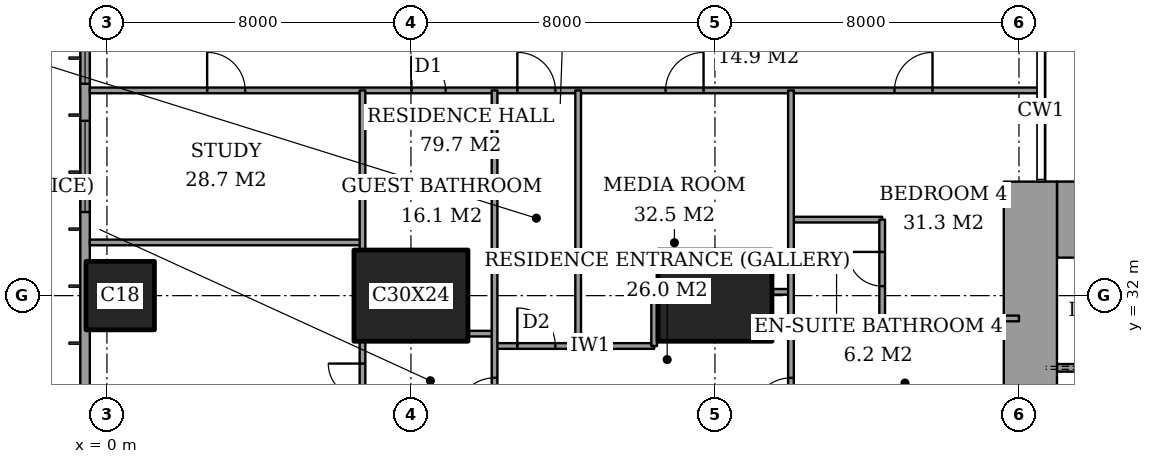
"""IFC4 building model, lengths in metres.
Left out: names, types, materials, properties, quantities, classifications, styles, units other than length and angle.
Written with IfcOpenShell. Run it as: python <this file> out.ifc"""

import sys

from ifc_helpers import new_model, si_unit, direction, frame, frame_2d, origin, origin_2d, place, context, subcontext, project, spatial, rectangle, extrude, element, fill, save


model = new_model("IFC4")
c1 = context("Model", 3, precision=1e-05, world=origin(), true_north=direction((0.0, 1.0)))
c2 = subcontext(c1, "Body", "Model", "MODEL_VIEW")
j1 = project(units=[si_unit("LENGTHUNIT", "METRE"), si_unit("PLANEANGLEUNIT", "RADIAN")], contexts=[c1])
p1 = place(None, origin())
s1 = spatial("IfcSite", under=j1, at=p1, CompositionType="ELEMENT")
p2 = place(p1, origin())
s2 = spatial("IfcBuilding", under=s1, at=p2, CompositionType="ELEMENT")
p3 = place(p2, frame((0.0, 0.0, 211.0)))
s3 = spatial("IfcBuildingStorey", under=s2, at=p3, CompositionType="ELEMENT", Elevation=211.0)
p4 = place(p3, frame((0.35, 32.0, 0.0), z_axis=(0.0, 0.0, 1.0), x_axis=(1.0, 0.0, 0.0)))
e1 = element("IfcColumn", 1, at=p4, inside=s3, PredefinedType="COLUMN", context=c2, shape_type="SweptSolid", body=[
    extrude(rectangle(XDim=1.8, YDim=1.8, at=origin_2d()), origin(), (0.0, 0.0, 1.0), 3.6),
])
for number, where, z_axis, x_axis in (
    (2, (8.0, 32.0, 0.0), (0.0, 0.0, 1.0), (1.0, 0.0, 0.0)),
    (3, (16.0, 32.0, 0.0), (0.0, 0.0, 1.0), (1.0, 0.0, 0.0)),
):
    element("IfcColumn", number, at=place(p3, frame(where, z_axis=z_axis, x_axis=x_axis)), inside=s3, PredefinedType="COLUMN", context=c2, shape_type="SweptSolid", body=[
        extrude(rectangle(XDim=3.0, YDim=2.4, at=origin_2d()), origin(), (0.0, 0.0, 1.0), 3.6),
    ])
p5 = place(p3, frame((25.0, 34.0, 0.0), z_axis=(0.0, 0.0, 1.0), x_axis=(1.0, 0.0, 0.0)))
e4 = element("IfcWall", 4, at=p5, inside=s3, PredefinedType="SHEAR", context=c2, shape_type="SweptSolid", body=[
    extrude(rectangle(XDim=3.15, YDim=2.0, at=frame_2d((1.575, 0.0))), origin(), (0.0, 0.0, 1.0), 3.6),
])
p6 = place(p3, frame((24.3, 23.15, 0.0), z_axis=(0.0, 0.0, 1.0), x_axis=(0.0, 1.0, 0.0)))
e5 = element("IfcWall", 5, at=p6, inside=s3, PredefinedType="SHEAR", context=c2, shape_type="SweptSolid", body=[
    extrude(rectangle(XDim=11.85, YDim=1.4, at=frame_2d((5.925, 0.0))), origin(), (0.0, 0.0, 1.0), 3.6),
])
p7 = place(p6, frame((0.75, 0.0, 0.0)))
e6 = element("IfcOpeningElement", 6, at=p7, cuts=e5, PredefinedType="OPENING", context=c2, shape_type="SweptSolid", body=[
    extrude(rectangle(XDim=1.8, YDim=2.4, at=frame_2d((0.9, 1.2))), frame((0.0, 0.71, 0.0), z_axis=(0.0, -1.0, 0.0), x_axis=(1.0, 0.0, 0.0)), (0.0, 0.0, 1.0), 1.42),
])
p8 = place(p3, frame((-0.575, 44.825, 0.0), z_axis=(0.0, 0.0, 1.0), x_axis=(0.0, -1.0, 0.0)))
e7 = element("IfcWall", 7, at=p8, inside=s3, PredefinedType="SOLIDWALL", context=c2, shape_type="SweptSolid", body=[
    extrude(rectangle(XDim=41.65, YDim=0.25, at=frame_2d((20.825, 0.0))), origin(), (0.0, 0.0, 1.0), 3.6),
])
p9 = place(p8, frame((0.825, 0.0, 0.2)))
e8 = element("IfcOpeningElement", 8, at=p9, cuts=e7, PredefinedType="OPENING", context=c2, shape_type="SweptSolid", body=[
    extrude(rectangle(XDim=2.4, YDim=2.4, at=frame_2d((1.2, 1.2))), frame((0.0, 0.135, 0.0), z_axis=(0.0, -1.0, 0.0), x_axis=(1.0, 0.0, 0.0)), (0.0, 0.0, 1.0), 0.27),
])
p10 = place(p8, frame((6.05, 0.0, 0.2)))
e9 = element("IfcOpeningElement", 9, at=p10, cuts=e7, PredefinedType="OPENING", context=c2, shape_type="SweptSolid", body=[
    extrude(rectangle(XDim=1.2, YDim=2.4, at=frame_2d((0.6, 1.2))), frame((0.0, 0.135, 0.0), z_axis=(0.0, -1.0, 0.0), x_axis=(1.0, 0.0, 0.0)), (0.0, 0.0, 1.0), 0.27),
])
p11 = place(p8, frame((8.225, 0.0, 0.2)))
e10 = element("IfcOpeningElement", 10, at=p11, cuts=e7, PredefinedType="OPENING", context=c2, shape_type="SweptSolid", body=[
    extrude(rectangle(XDim=2.4, YDim=2.4, at=frame_2d((1.2, 1.2))), frame((0.0, 0.135, 0.0), z_axis=(0.0, -1.0, 0.0), x_axis=(1.0, 0.0, 0.0)), (0.0, 0.0, 1.0), 0.27),
])
p12 = place(p8, frame((15.625, 0.0, 0.2)))
e11 = element("IfcOpeningElement", 11, at=p12, cuts=e7, PredefinedType="OPENING", context=c2, shape_type="SweptSolid", body=[
    extrude(rectangle(XDim=2.4, YDim=2.4, at=frame_2d((1.2, 1.2))), frame((0.0, 0.135, 0.0), z_axis=(0.0, -1.0, 0.0), x_axis=(1.0, 0.0, 0.0)), (0.0, 0.0, 1.0), 0.27),
])
p13 = place(p8, frame((23.625, 0.0, 0.2)))
e12 = element("IfcOpeningElement", 12, at=p13, cuts=e7, PredefinedType="OPENING", context=c2, shape_type="SweptSolid", body=[
    extrude(rectangle(XDim=2.4, YDim=2.4, at=frame_2d((1.2, 1.2))), frame((0.0, 0.135, 0.0), z_axis=(0.0, -1.0, 0.0), x_axis=(1.0, 0.0, 0.0)), (0.0, 0.0, 1.0), 0.27),
])
p14 = place(p8, frame((30.775, 0.0, 0.2)))
e13 = element("IfcOpeningElement", 13, at=p14, cuts=e7, PredefinedType="OPENING", context=c2, shape_type="SweptSolid", body=[
    extrude(rectangle(XDim=2.4, YDim=2.4, at=frame_2d((1.2, 1.2))), frame((0.0, 0.135, 0.0), z_axis=(0.0, -1.0, 0.0), x_axis=(1.0, 0.0, 0.0)), (0.0, 0.0, 1.0), 0.27),
])
p15 = place(p8, frame((34.55, 0.0, 0.2)))
e14 = element("IfcOpeningElement", 14, at=p15, cuts=e7, PredefinedType="OPENING", context=c2, shape_type="SweptSolid", body=[
    extrude(rectangle(XDim=1.2, YDim=2.4, at=frame_2d((0.6, 1.2))), frame((0.0, 0.135, 0.0), z_axis=(0.0, -1.0, 0.0), x_axis=(1.0, 0.0, 0.0)), (0.0, 0.0, 1.0), 0.27),
])
p16 = place(p8, frame((38.425, 0.0, 0.2)))
e15 = element("IfcOpeningElement", 15, at=p16, cuts=e7, PredefinedType="OPENING", context=c2, shape_type="SweptSolid", body=[
    extrude(rectangle(XDim=2.4, YDim=2.4, at=frame_2d((1.2, 1.2))), frame((0.0, 0.135, 0.0), z_axis=(0.0, -1.0, 0.0), x_axis=(1.0, 0.0, 0.0)), (0.0, 0.0, 1.0), 0.27),
])
p17 = place(p3, frame((10.2, 30.675, 0.0), z_axis=(0.0, 0.0, 1.0), x_axis=(1.0, 0.0, 0.0)))
e16 = element("IfcWall", 16, at=p17, inside=s3, PredefinedType="PARTITIONING", context=c2, shape_type="SweptSolid", body=[
    extrude(rectangle(XDim=4.2, YDim=0.15, at=frame_2d((2.1, 0.0))), origin(), (0.0, 0.0, 1.0), 3.35),
])
p18 = place(p17, frame((0.6, 0.0, 0.0)))
e17 = element("IfcOpeningElement", 17, at=p18, cuts=e16, PredefinedType="OPENING", context=c2, shape_type="SweptSolid", body=[
    extrude(rectangle(XDim=1.0, YDim=2.1, at=frame_2d((0.5, 1.05))), frame((0.0, 0.085, 0.0), z_axis=(0.0, -1.0, 0.0), x_axis=(1.0, 0.0, 0.0)), (0.0, 0.0, 1.0), 0.17),
])
p19 = place(p3, frame((9.5, 31.0, 0.0), z_axis=(0.0, 0.0, 1.0), x_axis=(1.0, 0.0, 0.0)))
e18 = element("IfcWall", 18, at=p19, inside=s3, PredefinedType="PARTITIONING", context=c2, shape_type="SweptSolid", body=[
    extrude(rectangle(XDim=0.7, YDim=0.15, at=frame_2d((0.35, 0.0))), origin(), (0.0, 0.0, 1.0), 3.35),
])
p20 = place(p3, frame((18.0, 31.4, 0.0), z_axis=(0.0, 0.0, 1.0), x_axis=(1.0, 0.0, 0.0)))
e19 = element("IfcWall", 19, at=p20, inside=s3, PredefinedType="PARTITIONING", context=c2, shape_type="SweptSolid", body=[
    extrude(rectangle(XDim=6.0, YDim=0.15, at=frame_2d((3.0, 0.0))), origin(), (0.0, 0.0, 1.0), 3.35),
])
p21 = place(p3, frame((17.5, 32.1, 0.0), z_axis=(0.0, 0.0, 1.0), x_axis=(1.0, 0.0, 0.0)))
e20 = element("IfcWall", 20, at=p21, inside=s3, PredefinedType="PARTITIONING", context=c2, shape_type="SweptSolid", body=[
    extrude(rectangle(XDim=0.5, YDim=0.15, at=frame_2d((0.25, 0.0))), origin(), (0.0, 0.0, 1.0), 2.634),
])
p22 = place(p3, frame((-0.45, 33.4, 0.0), z_axis=(0.0, 0.0, 1.0), x_axis=(1.0, 0.0, 0.0)))
e21 = element("IfcWall", 21, at=p22, inside=s3, PredefinedType="PARTITIONING", context=c2, shape_type="SweptSolid", body=[
    extrude(rectangle(XDim=7.175, YDim=0.15, at=frame_2d((3.587, 0.0))), origin(), (0.0, 0.0, 1.0), 3.35),
])
p23 = place(p3, frame((18.0, 34.0, 0.0), z_axis=(0.0, 0.0, 1.0), x_axis=(1.0, 0.0, 0.0)))
e22 = element("IfcWall", 22, at=p23, inside=s3, PredefinedType="PARTITIONING", context=c2, shape_type="SweptSolid", body=[
    extrude(rectangle(XDim=2.4, YDim=0.15, at=frame_2d((1.2, 0.0))), origin(), (0.0, 0.0, 1.0), 3.35),
])
p24 = place(p3, frame((-0.45, 37.4, 0.0), z_axis=(0.0, 0.0, 1.0), x_axis=(1.0, 0.0, 0.0)))
e23 = element("IfcWall", 23, at=p24, inside=s3, PredefinedType="PARTITIONING", context=c2, shape_type="SweptSolid", body=[
    extrude(rectangle(XDim=25.011, YDim=0.15, at=frame_2d((12.505, 0.0))), origin(), (0.0, 0.0, 1.0), 3.35),
])
p25 = place(p24, frame((11.25, 0.0, 0.0)))
e24 = element("IfcOpeningElement", 24, at=p25, cuts=e23, PredefinedType="OPENING", context=c2, shape_type="SweptSolid", body=[
    extrude(rectangle(XDim=1.0, YDim=2.1, at=frame_2d((0.5, 1.05))), frame((0.0, 0.085, 0.0), z_axis=(0.0, -1.0, 0.0), x_axis=(1.0, 0.0, 0.0)), (0.0, 0.0, 1.0), 0.17),
])
p26 = place(p24, frame((3.087, 0.0, 0.0)))
e25 = element("IfcOpeningElement", 25, at=p26, cuts=e23, PredefinedType="OPENING", context=c2, shape_type="SweptSolid", body=[
    extrude(rectangle(XDim=1.0, YDim=2.1, at=frame_2d((0.5, 1.05))), frame((0.0, 0.085, 0.0), z_axis=(0.0, -1.0, 0.0), x_axis=(1.0, 0.0, 0.0)), (0.0, 0.0, 1.0), 0.17),
])
p27 = place(p24, frame((8.462, 0.0, 0.0)))
e26 = element("IfcOpeningElement", 26, at=p27, cuts=e23, PredefinedType="OPENING", context=c2, shape_type="SweptSolid", body=[
    extrude(rectangle(XDim=0.9, YDim=2.1, at=frame_2d((0.45, 1.05))), frame((0.0, 0.085, 0.0), z_axis=(0.0, -1.0, 0.0), x_axis=(1.0, 0.0, 0.0)), (0.0, 0.0, 1.0), 0.17),
])
p28 = place(p24, frame((15.15, 0.0, 0.0)))
e27 = element("IfcOpeningElement", 27, at=p28, cuts=e23, PredefinedType="OPENING", context=c2, shape_type="SweptSolid", body=[
    extrude(rectangle(XDim=1.0, YDim=2.1, at=frame_2d((0.5, 1.05))), frame((0.0, 0.085, 0.0), z_axis=(0.0, -1.0, 0.0), x_axis=(1.0, 0.0, 0.0)), (0.0, 0.0, 1.0), 0.17),
])
p29 = place(p24, frame((21.175, 0.0, 0.0)))
e28 = element("IfcOpeningElement", 28, at=p29, cuts=e23, PredefinedType="OPENING", context=c2, shape_type="SweptSolid", body=[
    extrude(rectangle(XDim=1.0, YDim=2.1, at=frame_2d((0.5, 1.05))), frame((0.0, 0.085, 0.0), z_axis=(0.0, -1.0, 0.0), x_axis=(1.0, 0.0, 0.0)), (0.0, 0.0, 1.0), 0.17),
])
p30 = place(p3, frame((6.725, 28.35, 0.0), z_axis=(0.0, 0.0, 1.0), x_axis=(0.0, 1.0, 0.0)))
e29 = element("IfcWall", 29, at=p30, inside=s3, PredefinedType="PARTITIONING", context=c2, shape_type="SweptSolid", body=[
    extrude(rectangle(XDim=2.45, YDim=0.15, at=frame_2d((1.225, 0.0))), origin(), (0.0, 0.0, 1.0), 3.35),
])
p31 = place(p30, frame((0.962, 0.0, 0.0)))
e30 = element("IfcOpeningElement", 30, at=p31, cuts=e29, PredefinedType="OPENING", context=c2, shape_type="SweptSolid", body=[
    extrude(rectangle(XDim=0.9, YDim=2.1, at=frame_2d((0.45, 1.05))), frame((0.0, 0.085, 0.0), z_axis=(0.0, -1.0, 0.0), x_axis=(1.0, 0.0, 0.0)), (0.0, 0.0, 1.0), 0.17),
])
p32 = place(p3, frame((6.725, 33.2, 0.0), z_axis=(0.0, 0.0, 1.0), x_axis=(0.0, 1.0, 0.0)))
e31 = element("IfcWall", 31, at=p32, inside=s3, PredefinedType="PARTITIONING", context=c2, shape_type="SweptSolid", body=[
    extrude(rectangle(XDim=4.2, YDim=0.15, at=frame_2d((2.1, 0.0))), origin(), (0.0, 0.0, 1.0), 3.35),
])
p33 = place(p3, frame((10.2, 28.0, 0.0), z_axis=(0.0, 0.0, 1.0), x_axis=(0.0, 1.0, 0.0)))
e32 = element("IfcWall", 32, at=p33, inside=s3, PredefinedType="PARTITIONING", context=c2, shape_type="SweptSolid", body=[
    extrude(rectangle(XDim=9.4, YDim=0.15, at=frame_2d((4.7, 0.0))), origin(), (0.0, 0.0, 1.0), 3.35),
])
p34 = place(p33, frame((0.837, 0.0, 0.0)))
e33 = element("IfcOpeningElement", 33, at=p34, cuts=e32, PredefinedType="OPENING", context=c2, shape_type="SweptSolid", body=[
    extrude(rectangle(XDim=1.0, YDim=2.1, at=frame_2d((0.5, 1.05))), frame((0.0, 0.085, 0.0), z_axis=(0.0, -1.0, 0.0), x_axis=(1.0, 0.0, 0.0)), (0.0, 0.0, 1.0), 0.17),
])
p35 = place(p3, frame((12.4, 30.675, 0.0), z_axis=(0.0, 0.0, 1.0), x_axis=(0.0, 1.0, 0.0)))
e34 = element("IfcWall", 34, at=p35, inside=s3, PredefinedType="PARTITIONING", context=c2, shape_type="SweptSolid", body=[
    extrude(rectangle(XDim=6.725, YDim=0.15, at=frame_2d((3.362, 0.0))), origin(), (0.0, 0.0, 1.0), 3.35),
])
p36 = place(p3, frame((14.4, 30.675, 0.0), z_axis=(0.0, 0.0, 1.0), x_axis=(0.0, 1.0, 0.0)))
e35 = element("IfcWall", 35, at=p36, inside=s3, PredefinedType="PARTITIONING", context=c2, shape_type="SweptSolid", body=[
    extrude(rectangle(XDim=1.425, YDim=0.15, at=frame_2d((0.712, 0.0))), origin(), (0.0, 0.0, 1.0), 3.35),
])
p37 = place(p3, frame((18.0, 28.0, 0.0), z_axis=(0.0, 0.0, 1.0), x_axis=(0.0, 1.0, 0.0)))
e36 = element("IfcWall", 36, at=p37, inside=s3, PredefinedType="PARTITIONING", context=c2, shape_type="SweptSolid", body=[
    extrude(rectangle(XDim=9.4, YDim=0.15, at=frame_2d((4.7, 0.0))), origin(), (0.0, 0.0, 1.0), 3.35),
])
p38 = place(p37, frame((0.837, 0.0, 0.0)))
e37 = element("IfcOpeningElement", 37, at=p38, cuts=e36, PredefinedType="OPENING", context=c2, shape_type="SweptSolid", body=[
    extrude(rectangle(XDim=1.0, YDim=2.1, at=frame_2d((0.5, 1.05))), frame((0.0, 0.085, 0.0), z_axis=(0.0, -1.0, 0.0), x_axis=(1.0, 0.0, 0.0)), (0.0, 0.0, 1.0), 0.17),
])
p39 = place(p3, frame((20.4, 31.4, 0.0), z_axis=(0.0, 0.0, 1.0), x_axis=(0.0, 1.0, 0.0)))
e38 = element("IfcWall", 38, at=p39, inside=s3, PredefinedType="PARTITIONING", context=c2, shape_type="SweptSolid", body=[
    extrude(rectangle(XDim=2.6, YDim=0.15, at=frame_2d((1.3, 0.0))), origin(), (0.0, 0.0, 1.0), 3.35),
])
p40 = place(p39, frame((0.85, 0.0, 0.0)))
e39 = element("IfcOpeningElement", 39, at=p40, cuts=e38, PredefinedType="OPENING", context=c2, shape_type="SweptSolid", body=[
    extrude(rectangle(XDim=0.9, YDim=2.1, at=frame_2d((0.45, 1.05))), frame((0.0, 0.085, 0.0), z_axis=(0.0, -1.0, 0.0), x_axis=(1.0, 0.0, 0.0)), (0.0, 0.0, 1.0), 0.17),
])
p41 = place(p3, frame((25.0, 30.1, 0.0), z_axis=(0.0, 0.0, 1.0), x_axis=(1.0, 0.0, 0.0)))
e40 = element("IfcWall", 40, at=p41, inside=s3, PredefinedType="PARTITIONING", context=c2, shape_type="SweptSolid", body=[
    extrude(rectangle(XDim=12.7, YDim=0.2, at=frame_2d((6.35, 0.0))), origin(), (0.0, 0.0, 1.0), 3.6),
])
p42 = place(p41, frame((4.25, 0.0, 0.0)))
e41 = element("IfcOpeningElement", 41, at=p42, cuts=e40, PredefinedType="OPENING", context=c2, shape_type="SweptSolid", body=[
    extrude(rectangle(XDim=1.1, YDim=2.1, at=frame_2d((0.55, 1.05))), frame((0.0, 0.11, 0.0), z_axis=(0.0, -1.0, 0.0), x_axis=(1.0, 0.0, 0.0)), (0.0, 0.0, 1.0), 0.22),
])
p43 = place(p41, frame((7.45, 0.0, 0.0)))
e42 = element("IfcOpeningElement", 42, at=p43, cuts=e40, PredefinedType="OPENING", context=c2, shape_type="SweptSolid", body=[
    extrude(rectangle(XDim=1.1, YDim=2.1, at=frame_2d((0.55, 1.05))), frame((0.0, 0.11, 0.0), z_axis=(0.0, -1.0, 0.0), x_axis=(1.0, 0.0, 0.0)), (0.0, 0.0, 1.0), 0.22),
])
p44 = place(p41, frame((10.65, 0.0, 0.0)))
e43 = element("IfcOpeningElement", 43, at=p44, cuts=e40, PredefinedType="OPENING", context=c2, shape_type="SweptSolid", body=[
    extrude(rectangle(XDim=1.1, YDim=2.1, at=frame_2d((0.55, 1.05))), frame((0.0, 0.11, 0.0), z_axis=(0.0, -1.0, 0.0), x_axis=(1.0, 0.0, 0.0)), (0.0, 0.0, 1.0), 0.22),
])
p45 = place(p41, frame((0.9, 0.0, 0.0)))
e44 = element("IfcOpeningElement", 44, at=p45, cuts=e40, PredefinedType="OPENING", context=c2, shape_type="SweptSolid", body=[
    extrude(rectangle(XDim=1.2, YDim=2.1, at=frame_2d((0.6, 1.05))), frame((0.0, 0.11, 0.0), z_axis=(0.0, -1.0, 0.0), x_axis=(1.0, 0.0, 0.0)), (0.0, 0.0, 1.0), 0.22),
])
p46 = place(p10, origin())
e45 = element("IfcWindow", 45, at=p46, inside=s3, PartitioningType="SINGLE_PANEL", PredefinedType="WINDOW", context=c2, shape_type="SweptSolid", body=[
    extrude(rectangle(XDim=1.2, YDim=2.4, at=frame_2d((0.6, 1.2))), frame((0.0, 0.03, 0.0), z_axis=(0.0, -1.0, 0.0), x_axis=(1.0, 0.0, 0.0)), (0.0, 0.0, 1.0), 0.06),
])
fill(e9, e45)
p47 = place(p11, origin())
e46 = element("IfcWindow", 46, at=p47, inside=s3, PartitioningType="SINGLE_PANEL", PredefinedType="WINDOW", context=c2, shape_type="SweptSolid", body=[
    extrude(rectangle(XDim=2.4, YDim=2.4, at=frame_2d((1.2, 1.2))), frame((0.0, 0.03, 0.0), z_axis=(0.0, -1.0, 0.0), x_axis=(1.0, 0.0, 0.0)), (0.0, 0.0, 1.0), 0.06),
])
fill(e10, e46)
p48 = place(p25, origin())
e47 = element("IfcDoor", 47, at=p48, inside=s3, OperationType="SINGLE_SWING_RIGHT", PredefinedType="DOOR", context=c2, shape_type="SweptSolid", body=[
    extrude(rectangle(XDim=1.0, YDim=2.1, at=frame_2d((0.5, 1.05))), frame((0.0, 0.025, 0.0), z_axis=(0.0, -1.0, 0.0), x_axis=(1.0, 0.0, 0.0)), (0.0, 0.0, 1.0), 0.05),
])
fill(e24, e47)
p49 = place(p26, origin())
e48 = element("IfcDoor", 48, at=p49, inside=s3, OperationType="SINGLE_SWING_RIGHT", PredefinedType="DOOR", context=c2, shape_type="SweptSolid", body=[
    extrude(rectangle(XDim=1.0, YDim=2.1, at=frame_2d((0.5, 1.05))), frame((0.0, 0.025, 0.0), z_axis=(0.0, -1.0, 0.0), x_axis=(1.0, 0.0, 0.0)), (0.0, 0.0, 1.0), 0.05),
])
fill(e25, e48)
p50 = place(p31, origin())
e49 = element("IfcDoor", 49, at=p50, inside=s3, OperationType="SINGLE_SWING_LEFT", PredefinedType="DOOR", context=c2, shape_type="SweptSolid", body=[
    extrude(rectangle(XDim=0.9, YDim=2.1, at=frame_2d((0.45, 1.05))), frame((0.0, 0.025, 0.0), z_axis=(0.0, -1.0, 0.0), x_axis=(1.0, 0.0, 0.0)), (0.0, 0.0, 1.0), 0.05),
])
fill(e30, e49)
p51 = place(p27, origin())
e50 = element("IfcDoor", 50, at=p51, inside=s3, OperationType="SINGLE_SWING_RIGHT", PredefinedType="DOOR", context=c2, shape_type="SweptSolid", body=[
    extrude(rectangle(XDim=0.9, YDim=2.1, at=frame_2d((0.45, 1.05))), frame((0.0, 0.025, 0.0), z_axis=(0.0, -1.0, 0.0), x_axis=(1.0, 0.0, 0.0)), (0.0, 0.0, 1.0), 0.05),
])
fill(e26, e50)
p52 = place(p34, origin())
e51 = element("IfcDoor", 51, at=p52, inside=s3, OperationType="SINGLE_SWING_RIGHT", PredefinedType="DOOR", context=c2, shape_type="SweptSolid", body=[
    extrude(rectangle(XDim=1.0, YDim=2.1, at=frame_2d((0.5, 1.05))), frame((0.0, 0.025, 0.0), z_axis=(0.0, -1.0, 0.0), x_axis=(1.0, 0.0, 0.0)), (0.0, 0.0, 1.0), 0.05),
])
fill(e33, e51)
p53 = place(p18, origin())
e52 = element("IfcDoor", 52, at=p53, inside=s3, OperationType="SINGLE_SWING_RIGHT", PredefinedType="DOOR", context=c2, shape_type="SweptSolid", body=[
    extrude(rectangle(XDim=1.0, YDim=2.1, at=frame_2d((0.5, 1.05))), frame((0.0, 0.025, 0.0), z_axis=(0.0, -1.0, 0.0), x_axis=(1.0, 0.0, 0.0)), (0.0, 0.0, 1.0), 0.05),
])
fill(e17, e52)
p54 = place(p28, origin())
e53 = element("IfcDoor", 53, at=p54, inside=s3, OperationType="SINGLE_SWING_LEFT", PredefinedType="DOOR", context=c2, shape_type="SweptSolid", body=[
    extrude(rectangle(XDim=1.0, YDim=2.1, at=frame_2d((0.5, 1.05))), frame((0.0, 0.025, 0.0), z_axis=(0.0, -1.0, 0.0), x_axis=(1.0, 0.0, 0.0)), (0.0, 0.0, 1.0), 0.05),
])
fill(e27, e53)
p55 = place(p40, origin())
e54 = element("IfcDoor", 54, at=p55, inside=s3, OperationType="SINGLE_SWING_LEFT", PredefinedType="DOOR", context=c2, shape_type="SweptSolid", body=[
    extrude(rectangle(XDim=0.9, YDim=2.1, at=frame_2d((0.45, 1.05))), frame((0.0, 0.025, 0.0), z_axis=(0.0, -1.0, 0.0), x_axis=(1.0, 0.0, 0.0)), (0.0, 0.0, 1.0), 0.05),
])
fill(e39, e54)
p56 = place(p29, origin())
e55 = element("IfcDoor", 55, at=p56, inside=s3, OperationType="SINGLE_SWING_LEFT", PredefinedType="DOOR", context=c2, shape_type="SweptSolid", body=[
    extrude(rectangle(XDim=1.0, YDim=2.1, at=frame_2d((0.5, 1.05))), frame((0.0, 0.025, 0.0), z_axis=(0.0, -1.0, 0.0), x_axis=(1.0, 0.0, 0.0)), (0.0, 0.0, 1.0), 0.05),
])
fill(e28, e55)
p57 = place(p38, origin())
e56 = element("IfcDoor", 56, at=p57, inside=s3, OperationType="SINGLE_SWING_RIGHT", PredefinedType="DOOR", context=c2, shape_type="SweptSolid", body=[
    extrude(rectangle(XDim=1.0, YDim=2.1, at=frame_2d((0.5, 1.05))), frame((0.0, 0.025, 0.0), z_axis=(0.0, -1.0, 0.0), x_axis=(1.0, 0.0, 0.0)), (0.0, 0.0, 1.0), 0.05),
])
fill(e37, e56)
save(model, sys.argv[1])
